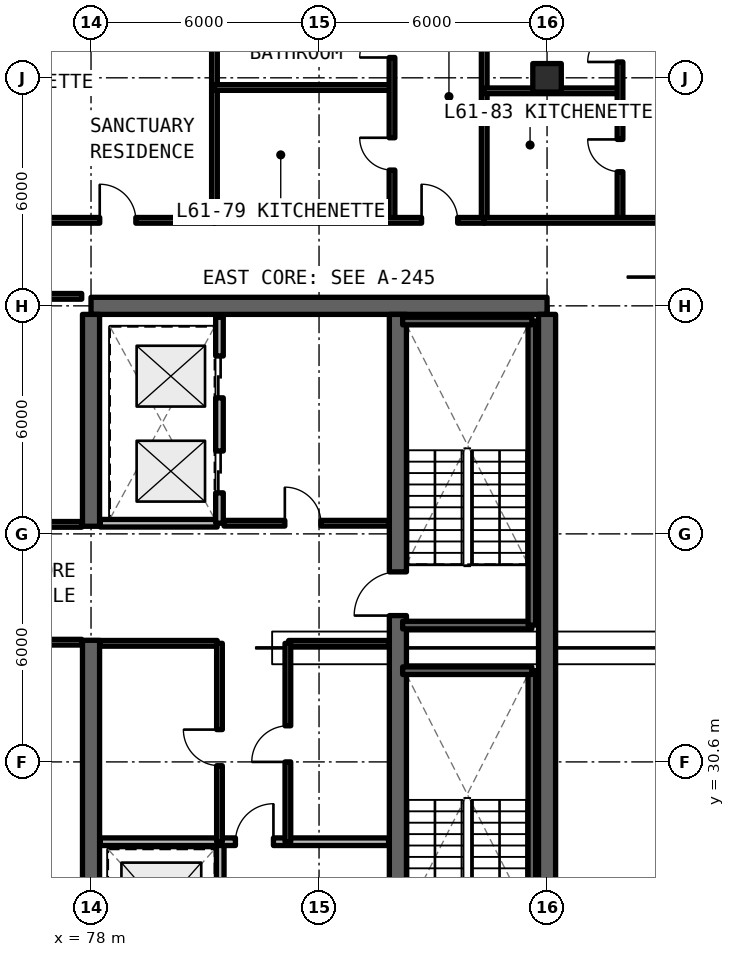
"""IFC4 building model, lengths in metres.
Left out: names, types, materials, properties, quantities, classifications, styles, units other than length and angle.
Written with IfcOpenShell. Run it as: python <this file> out.ifc"""

import sys

from ifc_helpers import new_model, si_unit, direction, frame, frame_2d, origin, origin_2d, place, context, subcontext, project, spatial, rectangle, extrude, element, fill, save


model = new_model("IFC4")
c1 = context("Model", 3, precision=1e-05, world=origin(), true_north=direction((0.0, 1.0)))
c2 = subcontext(c1, "Body", "Model", "MODEL_VIEW")
j1 = project(units=[si_unit("LENGTHUNIT", "METRE"), si_unit("PLANEANGLEUNIT", "RADIAN")], contexts=[c1])
p1 = place(None, origin())
s1 = spatial("IfcSite", under=j1, at=p1, CompositionType="ELEMENT")
p2 = place(p1, origin())
s2 = spatial("IfcBuilding", under=s1, at=p2, CompositionType="ELEMENT")
p3 = place(p2, frame((0.0, 0.0, 219.12)))
s3 = spatial("IfcBuildingStorey", under=s2, at=p3, CompositionType="ELEMENT", Elevation=219.12)
p4 = place(p3, frame((90.0, 42.6, 0.0), z_axis=(0.0, 0.0, 1.0), x_axis=(-1.0, 0.0, 0.0)))
e1 = element("IfcWall", 1, at=p4, inside=s3, PredefinedType="SHEAR", context=c2, shape_type="SweptSolid", body=[
    extrude(rectangle(XDim=12.0, YDim=0.45, at=frame_2d((6.0, 0.0))), origin(), (0.0, 0.0, 1.0), 3.63),
])
p5 = place(p3, frame((90.0, 24.825, 0.0), z_axis=(0.0, 0.0, 1.0), x_axis=(0.0, 1.0, 0.0)))
e2 = element("IfcWall", 2, at=p5, inside=s3, PredefinedType="SHEAR", context=c2, shape_type="SweptSolid", body=[
    extrude(rectangle(XDim=17.55, YDim=0.45, at=frame_2d((8.775, 0.0))), origin(), (0.0, 0.0, 1.0), 3.63),
])
p6 = place(p3, frame((78.0, 24.825, 0.0), z_axis=(0.0, 0.0, 1.0), x_axis=(0.0, 1.0, 0.0)))
e3 = element("IfcWall", 3, at=p6, inside=s3, PredefinedType="SHEAR", context=c2, shape_type="SweptSolid", body=[
    extrude(rectangle(XDim=8.975, YDim=0.45, at=frame_2d((4.488, 0.0))), origin(), (0.0, 0.0, 1.0), 3.63),
])
p7 = place(p3, frame((78.0, 36.8, 0.0), z_axis=(0.0, 0.0, 1.0), x_axis=(0.0, 1.0, 0.0)))
e4 = element("IfcWall", 4, at=p7, inside=s3, PredefinedType="SHEAR", context=c2, shape_type="SweptSolid", body=[
    extrude(rectangle(XDim=5.575, YDim=0.45, at=frame_2d((2.788, 0.0))), origin(), (0.0, 0.0, 1.0), 3.63),
])
p8 = place(p3, frame((86.075, 24.825, 0.0), z_axis=(0.0, 0.0, 1.0), x_axis=(0.0, 1.0, 0.0)))
e5 = element("IfcWall", 5, at=p8, inside=s3, PredefinedType="SHEAR", context=c2, shape_type="SweptSolid", body=[
    extrude(rectangle(XDim=17.55, YDim=0.45, at=frame_2d((8.775, 0.0))), origin(), (0.0, 0.0, 1.0), 3.63),
])
p9 = place(p8, frame((0.425, 0.0, 0.0)))
e6 = element("IfcOpeningElement", 6, at=p9, cuts=e5, PredefinedType="OPENING", context=c2, shape_type="SweptSolid", body=[
    extrude(rectangle(XDim=1.15, YDim=2.15, at=frame_2d((0.575, 1.075))), frame((0.0, 0.235, 0.0), z_axis=(0.0, -1.0, 0.0), x_axis=(1.0, 0.0, 0.0)), (0.0, 0.0, 1.0), 0.47),
])
p10 = place(p8, frame((9.625, 0.0, 0.0)))
e7 = element("IfcOpeningElement", 7, at=p10, cuts=e5, PredefinedType="OPENING", context=c2, shape_type="SweptSolid", body=[
    extrude(rectangle(XDim=1.15, YDim=2.15, at=frame_2d((0.575, 1.075))), frame((0.0, 0.235, 0.0), z_axis=(0.0, -1.0, 0.0), x_axis=(1.0, 0.0, 0.0)), (0.0, 0.0, 1.0), 0.47),
])
p11 = place(p3, frame((90.0, 48.6, 0.0), z_axis=(0.0, 0.0, 1.0), x_axis=(1.0, 0.0, 0.0)))
e8 = element("IfcColumn", 8, at=p11, inside=s3, PredefinedType="COLUMN", context=c2, shape_type="SweptSolid", body=[
    extrude(rectangle(XDim=0.75, YDim=0.75, at=origin_2d()), origin(), (0.0, 0.0, 1.0), 3.63),
])
p12 = place(p3, frame((81.4, 24.92, 0.0), z_axis=(0.0, 0.0, 1.0), x_axis=(0.0, 1.0, 0.0)))
e9 = element("IfcWall", 9, at=p12, inside=s3, PredefinedType="SOLIDWALL", context=c2, shape_type="SweptSolid", body=[
    extrude(rectangle(XDim=3.58, YDim=0.2, at=frame_2d((1.79, 0.0))), origin(), (0.0, 0.0, 1.0), 2.63),
])
p13 = place(p12, frame((1.3, 0.0, 0.0)))
e10 = element("IfcOpeningElement", 10, at=p13, cuts=e9, PredefinedType="OPENING", context=c2, shape_type="SweptSolid", body=[
    extrude(rectangle(XDim=1.1, YDim=2.2, at=frame_2d((0.55, 1.1))), frame((0.0, 0.11, 0.0), z_axis=(0.0, -1.0, 0.0), x_axis=(1.0, 0.0, 0.0)), (0.0, 0.0, 1.0), 0.22),
])
p14 = place(p3, frame((78.245, 28.5, 0.0), z_axis=(0.0, 0.0, 1.0), x_axis=(1.0, 0.0, 0.0)))
e11 = element("IfcWall", 11, at=p14, inside=s3, PredefinedType="SOLIDWALL", context=c2, shape_type="SweptSolid", body=[
    extrude(rectangle(XDim=7.585, YDim=0.2, at=frame_2d((3.792, 0.0))), origin(), (0.0, 0.0, 1.0), 2.63),
])
p15 = place(p14, frame((3.555, 0.0, 0.0)))
e12 = element("IfcOpeningElement", 12, at=p15, cuts=e11, PredefinedType="OPENING", context=c2, shape_type="SweptSolid", body=[
    extrude(rectangle(XDim=1.0, YDim=2.15, at=frame_2d((0.5, 1.075))), frame((0.0, 0.11, 0.0), z_axis=(0.0, -1.0, 0.0), x_axis=(1.0, 0.0, 0.0)), (0.0, 0.0, 1.0), 0.22),
])
p16 = place(p3, frame((83.2, 33.72, 0.0), z_axis=(0.0, 0.0, 1.0), x_axis=(1.0, 0.0, 0.0)))
e13 = element("IfcWall", 13, at=p16, inside=s3, PredefinedType="SOLIDWALL", context=c2, shape_type="SweptSolid", body=[
    extrude(rectangle(XDim=2.63, YDim=0.15, at=frame_2d((1.315, 0.0))), origin(), (0.0, 0.0, 1.0), 2.63),
])
p17 = place(p3, frame((83.18, 28.5, 0.0), z_axis=(0.0, 0.0, 1.0), x_axis=(0.0, 1.0, 0.0)))
e14 = element("IfcWall", 14, at=p17, inside=s3, PredefinedType="SOLIDWALL", context=c2, shape_type="SweptSolid", body=[
    extrude(rectangle(XDim=5.22, YDim=0.15, at=frame_2d((2.61, 0.0))), origin(), (0.0, 0.0, 1.0), 2.63),
])
p18 = place(p17, frame((2.1, 0.0, 0.0)))
e15 = element("IfcOpeningElement", 15, at=p18, cuts=e14, PredefinedType="OPENING", context=c2, shape_type="SweptSolid", body=[
    extrude(rectangle(XDim=0.95, YDim=2.15, at=frame_2d((0.475, 1.075))), frame((0.0, 0.085, 0.0), z_axis=(0.0, -1.0, 0.0), x_axis=(1.0, 0.0, 0.0)), (0.0, 0.0, 1.0), 0.17),
])
p19 = place(p3, frame((78.245, 33.72, 0.0), z_axis=(0.0, 0.0, 1.0), x_axis=(1.0, 0.0, 0.0)))
e16 = element("IfcWall", 16, at=p19, inside=s3, PredefinedType="SOLIDWALL", context=c2, shape_type="SweptSolid", body=[
    extrude(rectangle(XDim=3.075, YDim=0.15, at=frame_2d((1.538, 0.0))), origin(), (0.0, 0.0, 1.0), 2.63),
])
p20 = place(p3, frame((81.38, 28.5, 0.0), z_axis=(0.0, 0.0, 1.0), x_axis=(0.0, 1.0, 0.0)))
e17 = element("IfcWall", 17, at=p20, inside=s3, PredefinedType="SOLIDWALL", context=c2, shape_type="SweptSolid", body=[
    extrude(rectangle(XDim=5.22, YDim=0.15, at=frame_2d((2.61, 0.0))), origin(), (0.0, 0.0, 1.0), 2.63),
])
p21 = place(p20, frame((2.0, 0.0, 0.0)))
e18 = element("IfcOpeningElement", 18, at=p21, cuts=e17, PredefinedType="OPENING", context=c2, shape_type="SweptSolid", body=[
    extrude(rectangle(XDim=0.95, YDim=2.15, at=frame_2d((0.475, 1.075))), frame((0.0, 0.085, 0.0), z_axis=(0.0, -1.0, 0.0), x_axis=(1.0, 0.0, 0.0)), (0.0, 0.0, 1.0), 0.17),
])
p22 = place(p3, frame((81.5, 36.88, 0.0), z_axis=(0.0, 0.0, 1.0), x_axis=(1.0, 0.0, 0.0)))
e19 = element("IfcWall", 19, at=p22, inside=s3, PredefinedType="SOLIDWALL", context=c2, shape_type="SweptSolid", body=[
    extrude(rectangle(XDim=4.33, YDim=0.15, at=frame_2d((2.165, 0.0))), origin(), (0.0, 0.0, 1.0), 2.63),
])
p23 = place(p22, frame((1.6, 0.0, 0.0)))
e20 = element("IfcOpeningElement", 20, at=p23, cuts=e19, PredefinedType="OPENING", context=c2, shape_type="SweptSolid", body=[
    extrude(rectangle(XDim=0.95, YDim=2.15, at=frame_2d((0.475, 1.075))), frame((0.0, 0.085, 0.0), z_axis=(0.0, -1.0, 0.0), x_axis=(1.0, 0.0, 0.0)), (0.0, 0.0, 1.0), 0.17),
])
p24 = place(p3, frame((78.245, 36.88, 0.0), z_axis=(0.0, 0.0, 1.0), x_axis=(1.0, 0.0, 0.0)))
e21 = element("IfcWall", 21, at=p24, inside=s3, PredefinedType="SOLIDWALL", context=c2, shape_type="SweptSolid", body=[
    extrude(rectangle(XDim=3.075, YDim=0.2, at=frame_2d((1.538, 0.0))), origin(), (0.0, 0.0, 1.0), 2.63),
])
p25 = place(p3, frame((81.38, 36.88, 0.0), z_axis=(0.0, 0.0, 1.0), x_axis=(0.0, 1.0, 0.0)))
e22 = element("IfcWall", 22, at=p25, inside=s3, PredefinedType="SOLIDWALL", context=c2, shape_type="SweptSolid", body=[
    extrude(rectangle(XDim=5.42, YDim=0.2, at=frame_2d((2.71, 0.0))), origin(), (0.0, 0.0, 1.0), 2.63),
])
p26 = place(p25, frame((0.8, 0.0, 0.0)))
e23 = element("IfcOpeningElement", 23, at=p26, cuts=e22, PredefinedType="OPENING", context=c2, shape_type="SweptSolid", body=[
    extrude(rectangle(XDim=1.1, YDim=2.2, at=frame_2d((0.55, 1.1))), frame((0.0, 0.11, 0.0), z_axis=(0.0, -1.0, 0.0), x_axis=(1.0, 0.0, 0.0)), (0.0, 0.0, 1.0), 0.22),
])
p27 = place(p25, frame((3.3, 0.0, 0.0)))
e24 = element("IfcOpeningElement", 24, at=p27, cuts=e22, PredefinedType="OPENING", context=c2, shape_type="SweptSolid", body=[
    extrude(rectangle(XDim=1.1, YDim=2.2, at=frame_2d((0.55, 1.1))), frame((0.0, 0.11, 0.0), z_axis=(0.0, -1.0, 0.0), x_axis=(1.0, 0.0, 0.0)), (0.0, 0.0, 1.0), 0.22),
])
p28 = place(p3, frame((69.85, 33.75, 0.0), z_axis=(0.0, 0.0, 1.0), x_axis=(1.0, 0.0, 0.0)))
e25 = element("IfcWall", 25, at=p28, inside=s3, PredefinedType="SOLIDWALL", context=c2, shape_type="SweptSolid", body=[
    extrude(rectangle(XDim=7.905, YDim=0.15, at=frame_2d((3.952, 0.0))), origin(), (0.0, 0.0, 1.0), 2.63),
])
p29 = place(p28, frame((3.478, 0.0, 0.0)))
e26 = element("IfcOpeningElement", 26, at=p29, cuts=e25, PredefinedType="OPENING", context=c2, shape_type="SweptSolid", body=[
    extrude(rectangle(XDim=0.95, YDim=2.15, at=frame_2d((0.475, 1.075))), frame((0.0, 0.085, 0.0), z_axis=(0.0, -1.0, 0.0), x_axis=(1.0, 0.0, 0.0)), (0.0, 0.0, 1.0), 0.17),
])
p30 = place(p3, frame((69.85, 36.85, 0.0), z_axis=(0.0, 0.0, 1.0), x_axis=(1.0, 0.0, 0.0)))
e27 = element("IfcWall", 27, at=p30, inside=s3, PredefinedType="SOLIDWALL", context=c2, shape_type="SweptSolid", body=[
    extrude(rectangle(XDim=7.905, YDim=0.15, at=frame_2d((3.952, 0.0))), origin(), (0.0, 0.0, 1.0), 2.63),
])
p31 = place(p30, frame((3.478, 0.0, 0.0)))
e28 = element("IfcOpeningElement", 28, at=p31, cuts=e27, PredefinedType="OPENING", context=c2, shape_type="SweptSolid", body=[
    extrude(rectangle(XDim=0.95, YDim=2.15, at=frame_2d((0.475, 1.075))), frame((0.0, 0.085, 0.0), z_axis=(0.0, -1.0, 0.0), x_axis=(1.0, 0.0, 0.0)), (0.0, 0.0, 1.0), 0.17),
])
p32 = place(p3, frame((69.85, 42.85, 0.0), z_axis=(0.0, 0.0, 1.0), x_axis=(1.0, 0.0, 0.0)))
e29 = element("IfcWall", 29, at=p32, inside=s3, PredefinedType="SOLIDWALL", context=c2, shape_type="SweptSolid", body=[
    extrude(rectangle(XDim=7.905, YDim=0.15, at=frame_2d((3.952, 0.0))), origin(), (0.0, 0.0, 1.0), 2.63),
])
p33 = place(p3, frame((81.248, 44.85, 0.0), z_axis=(0.0, 0.0, 1.0), x_axis=(0.0, 1.0, 0.0)))
e30 = element("IfcWall", 30, at=p33, inside=s3, PredefinedType="SOLIDWALL", context=c2, shape_type="SweptSolid", body=[
    extrude(rectangle(XDim=10.08, YDim=0.15, at=frame_2d((5.04, 0.0))), origin(), (0.0, 0.0, 1.0), 2.63),
])
p34 = place(p3, frame((73.905, 44.85, 0.0), z_axis=(0.0, 0.0, 1.0), x_axis=(1.0, 0.0, 0.0)))
e31 = element("IfcWall", 31, at=p34, inside=s3, PredefinedType="SOLIDWALL", context=c2, shape_type="SweptSolid", body=[
    extrude(rectangle(XDim=7.343, YDim=0.15, at=frame_2d((3.672, 0.0))), origin(), (0.0, 0.0, 1.0), 2.63),
])
p35 = place(p34, frame((4.324, 0.0, 0.0)))
e32 = element("IfcOpeningElement", 32, at=p35, cuts=e31, PredefinedType="OPENING", context=c2, shape_type="SweptSolid", body=[
    extrude(rectangle(XDim=0.95, YDim=2.15, at=frame_2d((0.475, 1.075))), frame((0.0, 0.085, 0.0), z_axis=(0.0, -1.0, 0.0), x_axis=(1.0, 0.0, 0.0)), (0.0, 0.0, 1.0), 0.17),
])
p36 = place(p3, frame((88.346, 44.85, 0.0), z_axis=(0.0, 0.0, 1.0), x_axis=(0.0, 1.0, 0.0)))
e33 = element("IfcWall", 33, at=p36, inside=s3, PredefinedType="SOLIDWALL", context=c2, shape_type="SweptSolid", body=[
    extrude(rectangle(XDim=10.08, YDim=0.15, at=frame_2d((5.04, 0.0))), origin(), (0.0, 0.0, 1.0), 2.63),
])
p37 = place(p3, frame((81.248, 48.345, 0.0), z_axis=(0.0, 0.0, 1.0), x_axis=(1.0, 0.0, 0.0)))
e34 = element("IfcWall", 34, at=p37, inside=s3, PredefinedType="PARTITIONING", context=c2, shape_type="SweptSolid", body=[
    extrude(rectangle(XDim=4.672, YDim=0.15, at=frame_2d((2.336, 0.0))), origin(), (0.0, 0.0, 1.0), 2.63),
])
p38 = place(p3, frame((85.92, 44.85, 0.0), z_axis=(0.0, 0.0, 1.0), x_axis=(0.0, 1.0, 0.0)))
e35 = element("IfcWall", 35, at=p38, inside=s3, PredefinedType="PARTITIONING", context=c2, shape_type="SweptSolid", body=[
    extrude(rectangle(XDim=5.924, YDim=0.15, at=frame_2d((2.962, 0.0))), origin(), (0.0, 0.0, 1.0), 2.63),
])
p39 = place(p38, frame((1.323, 0.0, 0.0)))
e36 = element("IfcOpeningElement", 36, at=p39, cuts=e35, PredefinedType="OPENING", context=c2, shape_type="SweptSolid", body=[
    extrude(rectangle(XDim=0.85, YDim=2.1, at=frame_2d((0.425, 1.05))), frame((0.0, 0.085, 0.0), z_axis=(0.0, -1.0, 0.0), x_axis=(1.0, 0.0, 0.0)), (0.0, 0.0, 1.0), 0.17),
])
p40 = place(p38, frame((4.285, 0.0, 0.0)))
e37 = element("IfcOpeningElement", 37, at=p40, cuts=e35, PredefinedType="OPENING", context=c2, shape_type="SweptSolid", body=[
    extrude(rectangle(XDim=0.85, YDim=2.1, at=frame_2d((0.425, 1.05))), frame((0.0, 0.085, 0.0), z_axis=(0.0, -1.0, 0.0), x_axis=(1.0, 0.0, 0.0)), (0.0, 0.0, 1.0), 0.17),
])
p41 = place(p3, frame((81.248, 44.85, 0.0), z_axis=(0.0, 0.0, 1.0), x_axis=(1.0, 0.0, 0.0)))
e38 = element("IfcWall", 38, at=p41, inside=s3, PredefinedType="SOLIDWALL", context=c2, shape_type="SweptSolid", body=[
    extrude(rectangle(XDim=7.098, YDim=0.15, at=frame_2d((3.549, 0.0))), origin(), (0.0, 0.0, 1.0), 2.63),
])
p42 = place(p41, frame((5.45, 0.0, 0.0)))
e39 = element("IfcOpeningElement", 39, at=p42, cuts=e38, PredefinedType="OPENING", context=c2, shape_type="SweptSolid", body=[
    extrude(rectangle(XDim=0.95, YDim=2.15, at=frame_2d((0.475, 1.075))), frame((0.0, 0.085, 0.0), z_axis=(0.0, -1.0, 0.0), x_axis=(1.0, 0.0, 0.0)), (0.0, 0.0, 1.0), 0.17),
])
p43 = place(p3, frame((88.346, 48.258, 0.0), z_axis=(0.0, 0.0, 1.0), x_axis=(1.0, 0.0, 0.0)))
e40 = element("IfcWall", 40, at=p43, inside=s3, PredefinedType="PARTITIONING", context=c2, shape_type="SweptSolid", body=[
    extrude(rectangle(XDim=3.573, YDim=0.15, at=frame_2d((1.787, 0.0))), origin(), (0.0, 0.0, 1.0), 2.63),
])
p44 = place(p3, frame((91.92, 44.85, 0.0), z_axis=(0.0, 0.0, 1.0), x_axis=(0.0, 1.0, 0.0)))
e41 = element("IfcWall", 41, at=p44, inside=s3, PredefinedType="PARTITIONING", context=c2, shape_type="SweptSolid", body=[
    extrude(rectangle(XDim=5.776, YDim=0.15, at=frame_2d((2.888, 0.0))), origin(), (0.0, 0.0, 1.0), 2.63),
])
p45 = place(p44, frame((1.279, 0.0, 0.0)))
e42 = element("IfcOpeningElement", 42, at=p45, cuts=e41, PredefinedType="OPENING", context=c2, shape_type="SweptSolid", body=[
    extrude(rectangle(XDim=0.85, YDim=2.1, at=frame_2d((0.425, 1.05))), frame((0.0, 0.085, 0.0), z_axis=(0.0, -1.0, 0.0), x_axis=(1.0, 0.0, 0.0)), (0.0, 0.0, 1.0), 0.17),
])
p46 = place(p44, frame((4.167, 0.0, 0.0)))
e43 = element("IfcOpeningElement", 43, at=p46, cuts=e41, PredefinedType="OPENING", context=c2, shape_type="SweptSolid", body=[
    extrude(rectangle(XDim=0.85, YDim=2.1, at=frame_2d((0.425, 1.05))), frame((0.0, 0.085, 0.0), z_axis=(0.0, -1.0, 0.0), x_axis=(1.0, 0.0, 0.0)), (0.0, 0.0, 1.0), 0.17),
])
p47 = place(p3, frame((88.346, 44.85, 0.0), z_axis=(0.0, 0.0, 1.0), x_axis=(1.0, 0.0, 0.0)))
e44 = element("IfcWall", 44, at=p47, inside=s3, PredefinedType="SOLIDWALL", context=c2, shape_type="SweptSolid", body=[
    extrude(rectangle(XDim=6.854, YDim=0.15, at=frame_2d((3.427, 0.0))), origin(), (0.0, 0.0, 1.0), 2.63),
])
p48 = place(p47, frame((4.779, 0.0, 0.0)))
e45 = element("IfcOpeningElement", 45, at=p48, cuts=e44, PredefinedType="OPENING", context=c2, shape_type="SweptSolid", body=[
    extrude(rectangle(XDim=0.95, YDim=2.15, at=frame_2d((0.475, 1.075))), frame((0.0, 0.085, 0.0), z_axis=(0.0, -1.0, 0.0), x_axis=(1.0, 0.0, 0.0)), (0.0, 0.0, 1.0), 0.17),
])
p49 = place(p3, frame((89.6, 25.0, 0.0), z_axis=(0.0, 0.0, 1.0), x_axis=(0.0, 1.0, 0.0)))
e46 = element("IfcWall", 46, at=p49, inside=s3, PredefinedType="SOLIDWALL", context=c2, shape_type="SweptSolid", body=[
    extrude(rectangle(XDim=8.0, YDim=0.2, at=frame_2d((4.0, 0.0))), origin(), (0.0, 0.0, 1.0), 3.63),
])
for number, where, z_axis, x_axis in (
    (47, (89.6, 33.0, 0.0), (0.0, 0.0, 1.0), (-1.0, 0.0, 0.0)),
    (48, (86.2, 34.2, 0.0), (0.0, 0.0, 1.0), (1.0, 0.0, 0.0)),
):
    element("IfcWall", number, at=place(p3, frame(where, z_axis=z_axis, x_axis=x_axis)), inside=s3, PredefinedType="SOLIDWALL", context=c2, shape_type="SweptSolid", body=[
        extrude(rectangle(XDim=3.4, YDim=0.2, at=frame_2d((1.7, 0.0))), origin(), (0.0, 0.0, 1.0), 3.63),
    ])
p50 = place(p3, frame((89.6, 34.2, 0.0), z_axis=(0.0, 0.0, 1.0), x_axis=(0.0, 1.0, 0.0)))
e49 = element("IfcWall", 49, at=p50, inside=s3, PredefinedType="SOLIDWALL", context=c2, shape_type="SweptSolid", body=[
    extrude(rectangle(XDim=8.0, YDim=0.2, at=frame_2d((4.0, 0.0))), origin(), (0.0, 0.0, 1.0), 3.63),
])
p51 = place(p3, frame((89.6, 42.2, 0.0), z_axis=(0.0, 0.0, 1.0), x_axis=(-1.0, 0.0, 0.0)))
e50 = element("IfcWall", 50, at=p51, inside=s3, PredefinedType="SOLIDWALL", context=c2, shape_type="SweptSolid", body=[
    extrude(rectangle(XDim=3.4, YDim=0.2, at=frame_2d((1.7, 0.0))), origin(), (0.0, 0.0, 1.0), 3.63),
])
p52 = place(p15, origin())
e51 = element("IfcDoor", 51, at=p52, inside=s3, OperationType="SINGLE_SWING_RIGHT", PredefinedType="DOOR", context=c2, shape_type="SweptSolid", body=[
    extrude(rectangle(XDim=1.0, YDim=2.15, at=frame_2d((0.5, 1.075))), frame((0.0, 0.025, 0.0), z_axis=(0.0, -1.0, 0.0), x_axis=(1.0, 0.0, 0.0)), (0.0, 0.0, 1.0), 0.05),
])
fill(e12, e51)
p53 = place(p18, origin())
e52 = element("IfcDoor", 52, at=p53, inside=s3, OperationType="SINGLE_SWING_LEFT", PredefinedType="DOOR", context=c2, shape_type="SweptSolid", body=[
    extrude(rectangle(XDim=0.95, YDim=2.15, at=frame_2d((0.475, 1.075))), frame((0.0, 0.025, 0.0), z_axis=(0.0, -1.0, 0.0), x_axis=(1.0, 0.0, 0.0)), (0.0, 0.0, 1.0), 0.05),
])
fill(e15, e52)
p54 = place(p21, origin())
e53 = element("IfcDoor", 53, at=p54, inside=s3, OperationType="SINGLE_SWING_RIGHT", PredefinedType="DOOR", context=c2, shape_type="SweptSolid", body=[
    extrude(rectangle(XDim=0.95, YDim=2.15, at=frame_2d((0.475, 1.075))), frame((0.0, 0.025, 0.0), z_axis=(0.0, -1.0, 0.0), x_axis=(1.0, 0.0, 0.0)), (0.0, 0.0, 1.0), 0.05),
])
fill(e18, e53)
p55 = place(p23, origin())
e54 = element("IfcDoor", 54, at=p55, inside=s3, OperationType="SINGLE_SWING_LEFT", PredefinedType="DOOR", context=c2, shape_type="SweptSolid", body=[
    extrude(rectangle(XDim=0.95, YDim=2.15, at=frame_2d((0.475, 1.075))), frame((0.0, 0.025, 0.0), z_axis=(0.0, -1.0, 0.0), x_axis=(1.0, 0.0, 0.0)), (0.0, 0.0, 1.0), 0.05),
])
fill(e20, e54)
p56 = place(p26, origin())
e55 = element("IfcDoor", 55, at=p56, inside=s3, OperationType="SLIDING_TO_LEFT", PredefinedType="DOOR", context=c2, shape_type="SweptSolid", body=[
    extrude(rectangle(XDim=1.1, YDim=2.2, at=frame_2d((0.55, 1.1))), frame((0.0, 0.025, 0.0), z_axis=(0.0, -1.0, 0.0), x_axis=(1.0, 0.0, 0.0)), (0.0, 0.0, 1.0), 0.05),
])
fill(e23, e55)
p57 = place(p27, origin())
e56 = element("IfcDoor", 56, at=p57, inside=s3, OperationType="SLIDING_TO_RIGHT", PredefinedType="DOOR", context=c2, shape_type="SweptSolid", body=[
    extrude(rectangle(XDim=1.1, YDim=2.2, at=frame_2d((0.55, 1.1))), frame((0.0, 0.025, 0.0), z_axis=(0.0, -1.0, 0.0), x_axis=(1.0, 0.0, 0.0)), (0.0, 0.0, 1.0), 0.05),
])
fill(e24, e56)
p58 = place(p35, origin())
e57 = element("IfcDoor", 57, at=p58, inside=s3, OperationType="SINGLE_SWING_LEFT", PredefinedType="DOOR", context=c2, shape_type="SweptSolid", body=[
    extrude(rectangle(XDim=0.95, YDim=2.15, at=frame_2d((0.475, 1.075))), frame((0.0, 0.025, 0.0), z_axis=(0.0, -1.0, 0.0), x_axis=(1.0, 0.0, 0.0)), (0.0, 0.0, 1.0), 0.05),
])
fill(e32, e57)
p59 = place(p39, origin())
e58 = element("IfcDoor", 58, at=p59, inside=s3, OperationType="SINGLE_SWING_RIGHT", PredefinedType="DOOR", context=c2, shape_type="SweptSolid", body=[
    extrude(rectangle(XDim=0.85, YDim=2.1, at=frame_2d((0.425, 1.05))), frame((0.0, 0.025, 0.0), z_axis=(0.0, -1.0, 0.0), x_axis=(1.0, 0.0, 0.0)), (0.0, 0.0, 1.0), 0.05),
])
fill(e36, e58)
p60 = place(p40, origin())
e59 = element("IfcDoor", 59, at=p60, inside=s3, OperationType="SINGLE_SWING_LEFT", PredefinedType="DOOR", context=c2, shape_type="SweptSolid", body=[
    extrude(rectangle(XDim=0.85, YDim=2.1, at=frame_2d((0.425, 1.05))), frame((0.0, 0.025, 0.0), z_axis=(0.0, -1.0, 0.0), x_axis=(1.0, 0.0, 0.0)), (0.0, 0.0, 1.0), 0.05),
])
fill(e37, e59)
p61 = place(p42, origin())
e60 = element("IfcDoor", 60, at=p61, inside=s3, OperationType="SINGLE_SWING_LEFT", PredefinedType="DOOR", context=c2, shape_type="SweptSolid", body=[
    extrude(rectangle(XDim=0.95, YDim=2.15, at=frame_2d((0.475, 1.075))), frame((0.0, 0.025, 0.0), z_axis=(0.0, -1.0, 0.0), x_axis=(1.0, 0.0, 0.0)), (0.0, 0.0, 1.0), 0.05),
])
fill(e39, e60)
p62 = place(p45, origin())
e61 = element("IfcDoor", 61, at=p62, inside=s3, OperationType="SINGLE_SWING_RIGHT", PredefinedType="DOOR", context=c2, shape_type="SweptSolid", body=[
    extrude(rectangle(XDim=0.85, YDim=2.1, at=frame_2d((0.425, 1.05))), frame((0.0, 0.025, 0.0), z_axis=(0.0, -1.0, 0.0), x_axis=(1.0, 0.0, 0.0)), (0.0, 0.0, 1.0), 0.05),
])
fill(e42, e61)
p63 = place(p46, origin())
e62 = element("IfcDoor", 62, at=p63, inside=s3, OperationType="SINGLE_SWING_LEFT", PredefinedType="DOOR", context=c2, shape_type="SweptSolid", body=[
    extrude(rectangle(XDim=0.85, YDim=2.1, at=frame_2d((0.425, 1.05))), frame((0.0, 0.025, 0.0), z_axis=(0.0, -1.0, 0.0), x_axis=(1.0, 0.0, 0.0)), (0.0, 0.0, 1.0), 0.05),
])
fill(e43, e62)
p64 = place(p10, origin())
e63 = element("IfcDoor", 63, at=p64, inside=s3, OperationType="SINGLE_SWING_LEFT", PredefinedType="DOOR", context=c2, shape_type="SweptSolid", body=[
    extrude(rectangle(XDim=1.15, YDim=2.15, at=frame_2d((0.575, 1.075))), frame((0.0, 0.025, 0.0), z_axis=(0.0, -1.0, 0.0), x_axis=(1.0, 0.0, 0.0)), (0.0, 0.0, 1.0), 0.05),
])
fill(e7, e63)
save(model, sys.argv[1])
